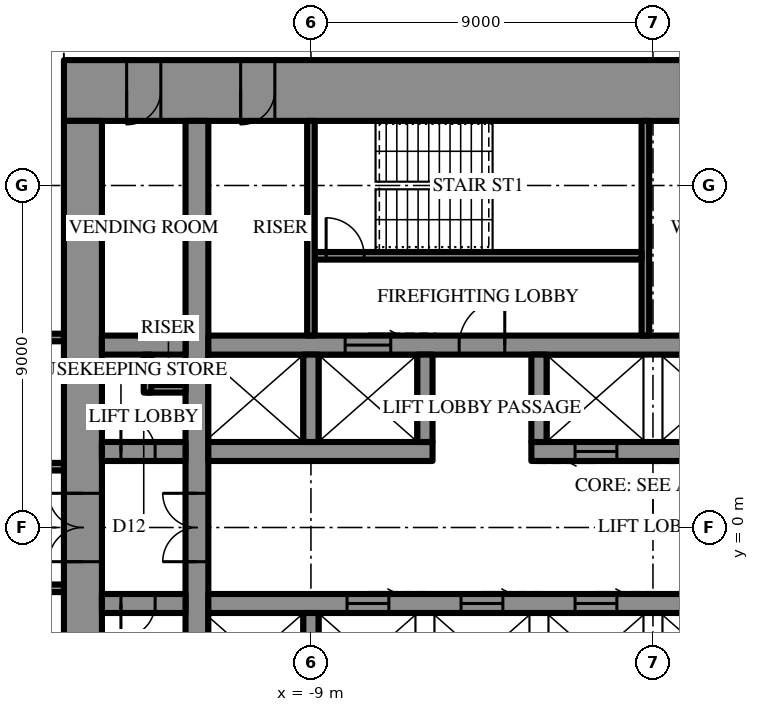
"""IFC4 building model, lengths in metres.
Left out: names, types, materials, properties, quantities, classifications, styles, units other than length and angle.
Written with IfcOpenShell. Run it as: python <this file> out.ifc"""

import sys

from ifc_helpers import new_model, si_unit, direction, frame, frame_2d, origin, place, context, subcontext, project, spatial, rectangle, extrude, element, fill, save


model = new_model("IFC4")
c1 = context("Model", 3, precision=1e-05, world=origin(), true_north=direction((0.0, 1.0)))
c2 = subcontext(c1, "Body", "Model", "MODEL_VIEW")
j1 = project(units=[si_unit("LENGTHUNIT", "METRE"), si_unit("PLANEANGLEUNIT", "RADIAN")], contexts=[c1])
p1 = place(None, origin())
s1 = spatial("IfcSite", under=j1, at=p1, CompositionType="ELEMENT")
p2 = place(p1, origin())
s2 = spatial("IfcBuilding", under=s1, at=p2, CompositionType="ELEMENT")
p3 = place(p2, frame((0.0, 0.0, 270.1)))
s3 = spatial("IfcBuildingStorey", under=s2, at=p3, CompositionType="ELEMENT", Elevation=270.1)
p4 = place(p3, frame((-15.5, 11.5, 0.0), z_axis=(0.0, 0.0, 1.0), x_axis=(1.0, 0.0, 0.0)))
e1 = element("IfcWall", 1, at=p4, inside=s3, PredefinedType="SHEAR", context=c2, shape_type="SweptSolid", body=[
    extrude(rectangle(XDim=31.0, YDim=1.6, at=frame_2d((15.5, 0.0))), origin(), (0.0, 0.0, 1.0), 4.2),
])
p5 = place(p4, frame((16.35, 0.0, 0.0)))
e2 = element("IfcOpeningElement", 2, at=p5, cuts=e1, PredefinedType="OPENING", context=c2, shape_type="SweptSolid", body=[
    extrude(rectangle(XDim=0.9, YDim=2.2, at=frame_2d((0.45, 1.1))), frame((0.0, 0.81, 0.0), z_axis=(0.0, -1.0, 0.0), x_axis=(1.0, 0.0, 0.0)), (0.0, 0.0, 1.0), 1.62),
])
p6 = place(p4, frame((19.35, 0.0, 0.0)))
e3 = element("IfcOpeningElement", 3, at=p6, cuts=e1, PredefinedType="OPENING", context=c2, shape_type="SweptSolid", body=[
    extrude(rectangle(XDim=0.9, YDim=2.2, at=frame_2d((0.45, 1.1))), frame((0.0, 0.81, 0.0), z_axis=(0.0, -1.0, 0.0), x_axis=(1.0, 0.0, 0.0)), (0.0, 0.0, 1.0), 1.62),
])
p7 = place(p4, frame((22.4, 0.0, 0.0)))
e4 = element("IfcOpeningElement", 4, at=p7, cuts=e1, PredefinedType="OPENING", context=c2, shape_type="SweptSolid", body=[
    extrude(rectangle(XDim=1.0, YDim=2.2, at=frame_2d((0.5, 1.1))), frame((0.0, 0.81, 0.0), z_axis=(0.0, -1.0, 0.0), x_axis=(1.0, 0.0, 0.0)), (0.0, 0.0, 1.0), 1.62),
])
p8 = place(p4, frame((1.65, 0.0, 0.0)))
e5 = element("IfcOpeningElement", 5, at=p8, cuts=e1, PredefinedType="OPENING", context=c2, shape_type="SweptSolid", body=[
    extrude(rectangle(XDim=0.9, YDim=2.2, at=frame_2d((0.45, 1.1))), frame((0.0, 0.81, 0.0), z_axis=(0.0, -1.0, 0.0), x_axis=(1.0, 0.0, 0.0)), (0.0, 0.0, 1.0), 1.62),
])
p9 = place(p4, frame((4.65, 0.0, 0.0)))
e6 = element("IfcOpeningElement", 6, at=p9, cuts=e1, PredefinedType="OPENING", context=c2, shape_type="SweptSolid", body=[
    extrude(rectangle(XDim=0.9, YDim=2.2, at=frame_2d((0.45, 1.1))), frame((0.0, 0.81, 0.0), z_axis=(0.0, -1.0, 0.0), x_axis=(1.0, 0.0, 0.0)), (0.0, 0.0, 1.0), 1.62),
])
p10 = place(p4, frame((25.45, 0.0, 0.0)))
e7 = element("IfcOpeningElement", 7, at=p10, cuts=e1, PredefinedType="OPENING", context=c2, shape_type="SweptSolid", body=[
    extrude(rectangle(XDim=0.9, YDim=2.2, at=frame_2d((0.45, 1.1))), frame((0.0, 0.81, 0.0), z_axis=(0.0, -1.0, 0.0), x_axis=(1.0, 0.0, 0.0)), (0.0, 0.0, 1.0), 1.62),
])
p11 = place(p4, frame((28.45, 0.0, 0.0)))
e8 = element("IfcOpeningElement", 8, at=p11, cuts=e1, PredefinedType="OPENING", context=c2, shape_type="SweptSolid", body=[
    extrude(rectangle(XDim=0.9, YDim=2.2, at=frame_2d((0.45, 1.1))), frame((0.0, 0.81, 0.0), z_axis=(0.0, -1.0, 0.0), x_axis=(1.0, 0.0, 0.0)), (0.0, 0.0, 1.0), 1.62),
])
p12 = place(p3, frame((-15.0, 10.7, 0.0), z_axis=(0.0, 0.0, 1.0), x_axis=(0.0, -1.0, 0.0)))
e9 = element("IfcWall", 9, at=p12, inside=s3, PredefinedType="SHEAR", context=c2, shape_type="SweptSolid", body=[
    extrude(rectangle(XDim=21.4, YDim=1.0, at=frame_2d((10.7, 0.0))), origin(), (0.0, 0.0, 1.0), 4.2),
])
p13 = place(p12, frame((9.8, 0.0, 0.0)))
e10 = element("IfcOpeningElement", 10, at=p13, cuts=e9, PredefinedType="OPENING", context=c2, shape_type="SweptSolid", body=[
    extrude(rectangle(XDim=1.8, YDim=2.4, at=frame_2d((0.9, 1.2))), frame((0.0, 0.51, 0.0), z_axis=(0.0, -1.0, 0.0), x_axis=(1.0, 0.0, 0.0)), (0.0, 0.0, 1.0), 1.02),
])
p14 = place(p3, frame((-12.0, -10.7, 0.0), z_axis=(0.0, 0.0, 1.0), x_axis=(0.0, 1.0, 0.0)))
e11 = element("IfcWall", 11, at=p14, inside=s3, PredefinedType="SHEAR", context=c2, shape_type="SweptSolid", body=[
    extrude(rectangle(XDim=21.4, YDim=0.6, at=frame_2d((10.7, 0.0))), origin(), (0.0, 0.0, 1.0), 4.2),
])
p15 = place(p14, frame((9.8, 0.0, 0.0)))
e12 = element("IfcOpeningElement", 12, at=p15, cuts=e11, PredefinedType="OPENING", context=c2, shape_type="SweptSolid", body=[
    extrude(rectangle(XDim=1.8, YDim=2.4, at=frame_2d((0.9, 1.2))), frame((0.0, 0.31, 0.0), z_axis=(0.0, -1.0, 0.0), x_axis=(1.0, 0.0, 0.0)), (0.0, 0.0, 1.0), 0.62),
])
p16 = place(p3, frame((-14.5, 2.0, 0.0), z_axis=(0.0, 0.0, 1.0), x_axis=(1.0, 0.0, 0.0)))
e13 = element("IfcWall", 13, at=p16, inside=s3, PredefinedType="SHEAR", context=c2, shape_type="SweptSolid", body=[
    extrude(rectangle(XDim=2.2, YDim=0.5, at=frame_2d((1.1, 0.0))), origin(), (0.0, 0.0, 1.0), 4.2),
])
p17 = place(p16, frame((0.5, 0.0, 0.0)))
e14 = element("IfcOpeningElement", 14, at=p17, cuts=e13, PredefinedType="OPENING", context=c2, shape_type="SweptSolid", body=[
    extrude(rectangle(XDim=0.9, YDim=2.2, at=frame_2d((0.45, 1.1))), frame((0.0, 0.26, 0.0), z_axis=(0.0, -1.0, 0.0), x_axis=(1.0, 0.0, 0.0)), (0.0, 0.0, 1.0), 0.52),
])
p18 = place(p3, frame((-11.7, 2.0, 0.0), z_axis=(0.0, 0.0, 1.0), x_axis=(1.0, 0.0, 0.0)))
e15 = element("IfcWall", 15, at=p18, inside=s3, PredefinedType="SHEAR", context=c2, shape_type="SweptSolid", body=[
    extrude(rectangle(XDim=5.9, YDim=0.5, at=frame_2d((2.95, 0.0))), origin(), (0.0, 0.0, 1.0), 4.2),
])
p19 = place(p3, frame((-3.2, 2.0, 0.0), z_axis=(0.0, 0.0, 1.0), x_axis=(1.0, 0.0, 0.0)))
e16 = element("IfcWall", 16, at=p19, inside=s3, PredefinedType="SHEAR", context=c2, shape_type="SweptSolid", body=[
    extrude(rectangle(XDim=14.9, YDim=0.5, at=frame_2d((7.45, 0.0))), origin(), (0.0, 0.0, 1.0), 4.2),
])
p20 = place(p19, frame((1.15, 0.0, 0.0)))
e17 = element("IfcOpeningElement", 17, at=p20, cuts=e16, PredefinedType="OPENING", context=c2, shape_type="SweptSolid", body=[
    extrude(rectangle(XDim=1.1, YDim=2.2, at=frame_2d((0.55, 1.1))), frame((0.0, 0.26, 0.0), z_axis=(0.0, -1.0, 0.0), x_axis=(1.0, 0.0, 0.0)), (0.0, 0.0, 1.0), 0.52),
])
p21 = place(p19, frame((4.15, 0.0, 0.0)))
e18 = element("IfcOpeningElement", 18, at=p21, cuts=e16, PredefinedType="OPENING", context=c2, shape_type="SweptSolid", body=[
    extrude(rectangle(XDim=1.1, YDim=2.2, at=frame_2d((0.55, 1.1))), frame((0.0, 0.26, 0.0), z_axis=(0.0, -1.0, 0.0), x_axis=(1.0, 0.0, 0.0)), (0.0, 0.0, 1.0), 0.52),
])
p22 = place(p19, frame((7.15, 0.0, 0.0)))
e19 = element("IfcOpeningElement", 19, at=p22, cuts=e16, PredefinedType="OPENING", context=c2, shape_type="SweptSolid", body=[
    extrude(rectangle(XDim=1.1, YDim=2.2, at=frame_2d((0.55, 1.1))), frame((0.0, 0.26, 0.0), z_axis=(0.0, -1.0, 0.0), x_axis=(1.0, 0.0, 0.0)), (0.0, 0.0, 1.0), 0.52),
])
p23 = place(p19, frame((10.15, 0.0, 0.0)))
e20 = element("IfcOpeningElement", 20, at=p23, cuts=e16, PredefinedType="OPENING", context=c2, shape_type="SweptSolid", body=[
    extrude(rectangle(XDim=1.1, YDim=2.2, at=frame_2d((0.55, 1.1))), frame((0.0, 0.26, 0.0), z_axis=(0.0, -1.0, 0.0), x_axis=(1.0, 0.0, 0.0)), (0.0, 0.0, 1.0), 0.52),
])
p24 = place(p3, frame((-14.5, 4.8, 0.0), z_axis=(0.0, 0.0, 1.0), x_axis=(1.0, 0.0, 0.0)))
e21 = element("IfcWall", 21, at=p24, inside=s3, PredefinedType="SHEAR", context=c2, shape_type="SweptSolid", body=[
    extrude(rectangle(XDim=2.2, YDim=0.5, at=frame_2d((1.1, 0.0))), origin(), (0.0, 0.0, 1.0), 4.2),
])
p25 = place(p3, frame((-11.7, 4.8, 0.0), z_axis=(0.0, 0.0, 1.0), x_axis=(1.0, 0.0, 0.0)))
e22 = element("IfcWall", 22, at=p25, inside=s3, PredefinedType="SHEAR", context=c2, shape_type="SweptSolid", body=[
    extrude(rectangle(XDim=23.4, YDim=0.5, at=frame_2d((11.7, 0.0))), origin(), (0.0, 0.0, 1.0), 4.2),
])
p26 = place(p25, frame((6.6, 0.0, 0.0)))
e23 = element("IfcOpeningElement", 23, at=p26, cuts=e22, PredefinedType="OPENING", context=c2, shape_type="SweptSolid", body=[
    extrude(rectangle(XDim=1.2, YDim=2.2, at=frame_2d((0.6, 1.1))), frame((0.0, 0.26, 0.0), z_axis=(0.0, -1.0, 0.0), x_axis=(1.0, 0.0, 0.0)), (0.0, 0.0, 1.0), 0.52),
])
p27 = place(p25, frame((3.6, 0.0, 0.0)))
e24 = element("IfcOpeningElement", 24, at=p27, cuts=e22, PredefinedType="OPENING", context=c2, shape_type="SweptSolid", body=[
    extrude(rectangle(XDim=1.2, YDim=2.2, at=frame_2d((0.6, 1.1))), frame((0.0, 0.26, 0.0), z_axis=(0.0, -1.0, 0.0), x_axis=(1.0, 0.0, 0.0)), (0.0, 0.0, 1.0), 0.52),
])
for number, where, z_axis, x_axis in (
    (25, (-9.0, 2.25, 0.0), (0.0, 0.0, 1.0), (0.0, 1.0, 0.0)),
    (26, (-6.0, 2.25, 0.0), (0.0, 0.0, 1.0), (0.0, 1.0, 0.0)),
    (27, (-3.0, 2.25, 0.0), (0.0, 0.0, 1.0), (0.0, 1.0, 0.0)),
):
    element("IfcWall", number, at=place(p3, frame(where, z_axis=z_axis, x_axis=x_axis)), inside=s3, PredefinedType="SHEAR", context=c2, shape_type="SweptSolid", body=[
        extrude(rectangle(XDim=2.3, YDim=0.4, at=frame_2d((1.15, 0.0))), origin(), (0.0, 0.0, 1.0), 4.2),
    ])
p28 = place(p3, frame((-0.2, 5.05, 0.0), z_axis=(0.0, 0.0, 1.0), x_axis=(0.0, 1.0, 0.0)))
e28 = element("IfcWall", 28, at=p28, inside=s3, PredefinedType="SHEAR", context=c2, shape_type="SweptSolid", body=[
    extrude(rectangle(XDim=5.65, YDim=0.2, at=frame_2d((2.825, 0.0))), origin(), (0.0, 0.0, 1.0), 4.2),
])
p29 = place(p3, frame((-8.9, 7.15, 0.0), z_axis=(0.0, 0.0, 1.0), x_axis=(1.0, 0.0, 0.0)))
e29 = element("IfcWall", 29, at=p29, inside=s3, PredefinedType="SHEAR", context=c2, shape_type="SweptSolid", body=[
    extrude(rectangle(XDim=8.6, YDim=0.2, at=frame_2d((4.3, 0.0))), origin(), (0.0, 0.0, 1.0), 4.2),
])
p30 = place(p29, frame((0.3, 0.0, 0.0)))
e30 = element("IfcOpeningElement", 30, at=p30, cuts=e29, PredefinedType="OPENING", context=c2, shape_type="SweptSolid", body=[
    extrude(rectangle(XDim=1.0, YDim=2.2, at=frame_2d((0.5, 1.1))), frame((0.0, 0.11, 0.0), z_axis=(0.0, -1.0, 0.0), x_axis=(1.0, 0.0, 0.0)), (0.0, 0.0, 1.0), 0.22),
])
p31 = place(p3, frame((3.2, -2.0, 0.0), z_axis=(0.0, 0.0, 1.0), x_axis=(-1.0, 0.0, 0.0)))
e31 = element("IfcWall", 31, at=p31, inside=s3, PredefinedType="SHEAR", context=c2, shape_type="SweptSolid", body=[
    extrude(rectangle(XDim=14.9, YDim=0.5, at=frame_2d((7.45, 0.0))), origin(), (0.0, 0.0, 1.0), 4.2),
])
p32 = place(p31, frame((1.15, 0.0, 0.0)))
e32 = element("IfcOpeningElement", 32, at=p32, cuts=e31, PredefinedType="OPENING", context=c2, shape_type="SweptSolid", body=[
    extrude(rectangle(XDim=1.1, YDim=2.2, at=frame_2d((0.55, 1.1))), frame((0.0, 0.26, 0.0), z_axis=(0.0, -1.0, 0.0), x_axis=(1.0, 0.0, 0.0)), (0.0, 0.0, 1.0), 0.52),
])
p33 = place(p31, frame((4.15, 0.0, 0.0)))
e33 = element("IfcOpeningElement", 33, at=p33, cuts=e31, PredefinedType="OPENING", context=c2, shape_type="SweptSolid", body=[
    extrude(rectangle(XDim=1.1, YDim=2.2, at=frame_2d((0.55, 1.1))), frame((0.0, 0.26, 0.0), z_axis=(0.0, -1.0, 0.0), x_axis=(1.0, 0.0, 0.0)), (0.0, 0.0, 1.0), 0.52),
])
p34 = place(p31, frame((7.15, 0.0, 0.0)))
e34 = element("IfcOpeningElement", 34, at=p34, cuts=e31, PredefinedType="OPENING", context=c2, shape_type="SweptSolid", body=[
    extrude(rectangle(XDim=1.1, YDim=2.2, at=frame_2d((0.55, 1.1))), frame((0.0, 0.26, 0.0), z_axis=(0.0, -1.0, 0.0), x_axis=(1.0, 0.0, 0.0)), (0.0, 0.0, 1.0), 0.52),
])
p35 = place(p31, frame((10.15, 0.0, 0.0)))
e35 = element("IfcOpeningElement", 35, at=p35, cuts=e31, PredefinedType="OPENING", context=c2, shape_type="SweptSolid", body=[
    extrude(rectangle(XDim=1.1, YDim=2.2, at=frame_2d((0.55, 1.1))), frame((0.0, 0.26, 0.0), z_axis=(0.0, -1.0, 0.0), x_axis=(1.0, 0.0, 0.0)), (0.0, 0.0, 1.0), 0.52),
])
p36 = place(p3, frame((-12.3, -2.0, 0.0), z_axis=(0.0, 0.0, 1.0), x_axis=(-1.0, 0.0, 0.0)))
e36 = element("IfcWall", 36, at=p36, inside=s3, PredefinedType="SHEAR", context=c2, shape_type="SweptSolid", body=[
    extrude(rectangle(XDim=2.2, YDim=0.5, at=frame_2d((1.1, 0.0))), origin(), (0.0, 0.0, 1.0), 4.2),
])
p37 = place(p36, frame((0.8, 0.0, 0.0)))
e37 = element("IfcOpeningElement", 37, at=p37, cuts=e36, PredefinedType="OPENING", context=c2, shape_type="SweptSolid", body=[
    extrude(rectangle(XDim=0.9, YDim=2.2, at=frame_2d((0.45, 1.1))), frame((0.0, 0.26, 0.0), z_axis=(0.0, -1.0, 0.0), x_axis=(1.0, 0.0, 0.0)), (0.0, 0.0, 1.0), 0.52),
])
p38 = place(p3, frame((-9.0, -2.25, 0.0), z_axis=(0.0, 0.0, 1.0), x_axis=(0.0, -1.0, 0.0)))
e38 = element("IfcWall", 38, at=p38, inside=s3, PredefinedType="SHEAR", context=c2, shape_type="SweptSolid", body=[
    extrude(rectangle(XDim=2.3, YDim=0.4, at=frame_2d((1.15, 0.0))), origin(), (0.0, 0.0, 1.0), 4.2),
])
p39 = place(p3, frame((-9.0, 5.05, 0.0), z_axis=(0.0, 0.0, 1.0), x_axis=(0.0, 1.0, 0.0)))
e39 = element("IfcWall", 39, at=p39, inside=s3, PredefinedType="PARTITIONING", context=c2, shape_type="SweptSolid", body=[
    extrude(rectangle(XDim=5.65, YDim=0.2, at=frame_2d((2.825, 0.0))), origin(), (0.0, 0.0, 1.0), 4.0),
])
for number, where, z_axis, x_axis in (
    (40, (-13.3, 3.65, 0.0), (0.0, 0.0, 1.0), (1.0, 0.0, 0.0)),
    (41, (-13.3, 3.55, 0.0), (0.0, 0.0, 1.0), (0.0, 1.0, 0.0)),
):
    element("IfcWall", number, at=place(p3, frame(where, z_axis=z_axis, x_axis=x_axis)), inside=s3, PredefinedType="PARTITIONING", context=c2, shape_type="SweptSolid", body=[
        extrude(rectangle(XDim=1.0, YDim=0.2, at=frame_2d((0.5, 0.0))), origin(), (0.0, 0.0, 1.0), 4.0),
    ])
p40 = place(p3, frame((-15.5, 1.6, 0.0), z_axis=(0.0, 0.0, 1.0), x_axis=(-1.0, 0.0, 0.0)))
e42 = element("IfcWall", 42, at=p40, inside=s3, PredefinedType="PARTITIONING", context=c2, shape_type="SweptSolid", body=[
    extrude(rectangle(XDim=12.2, YDim=0.2, at=frame_2d((6.1, 0.0))), origin(), (0.0, 0.0, 1.0), 4.0),
])
p41 = place(p40, frame((8.04, 0.0, 0.0)))
e43 = element("IfcOpeningElement", 43, at=p41, cuts=e42, PredefinedType="OPENING", context=c2, shape_type="SweptSolid", body=[
    extrude(rectangle(XDim=1.0, YDim=2.2, at=frame_2d((0.5, 1.1))), frame((0.0, 0.11, 0.0), z_axis=(0.0, -1.0, 0.0), x_axis=(1.0, 0.0, 0.0)), (0.0, 0.0, 1.0), 0.22),
])
p42 = place(p3, frame((-15.5, -1.6, 0.0), z_axis=(0.0, 0.0, 1.0), x_axis=(-1.0, 0.0, 0.0)))
e44 = element("IfcWall", 44, at=p42, inside=s3, PredefinedType="PARTITIONING", context=c2, shape_type="SweptSolid", body=[
    extrude(rectangle(XDim=12.2, YDim=0.2, at=frame_2d((6.1, 0.0))), origin(), (0.0, 0.0, 1.0), 4.0),
])
p43 = place(p42, frame((8.04, 0.0, 0.0)))
e45 = element("IfcOpeningElement", 45, at=p43, cuts=e44, PredefinedType="OPENING", context=c2, shape_type="SweptSolid", body=[
    extrude(rectangle(XDim=1.0, YDim=2.2, at=frame_2d((0.5, 1.1))), frame((0.0, 0.11, 0.0), z_axis=(0.0, -1.0, 0.0), x_axis=(1.0, 0.0, 0.0)), (0.0, 0.0, 1.0), 0.22),
])
p44 = place(p3, frame((-15.5, 5.0, 0.0), z_axis=(0.0, 0.0, 1.0), x_axis=(-1.0, 0.0, 0.0)))
e46 = element("IfcWall", 46, at=p44, inside=s3, PredefinedType="PARTITIONING", context=c2, shape_type="SweptSolid", body=[
    extrude(rectangle(XDim=14.845, YDim=0.2, at=frame_2d((7.423, 0.0))), origin(), (0.0, 0.0, 1.0), 4.0),
])
p45 = place(p44, frame((0.985, 0.0, 0.0)))
e47 = element("IfcOpeningElement", 47, at=p45, cuts=e46, PredefinedType="OPENING", context=c2, shape_type="SweptSolid", body=[
    extrude(rectangle(XDim=1.0, YDim=2.2, at=frame_2d((0.5, 1.1))), frame((0.0, 0.11, 0.0), z_axis=(0.0, -1.0, 0.0), x_axis=(1.0, 0.0, 0.0)), (0.0, 0.0, 1.0), 0.22),
])
p46 = place(p13, frame((1.8, 0.0, 0.0), z_axis=(0.0, 0.0, 1.0), x_axis=(-1.0, 0.0, 0.0)))
e48 = element("IfcDoor", 48, at=p46, inside=s3, OperationType="DOUBLE_DOOR_SINGLE_SWING", PredefinedType="DOOR", context=c2, shape_type="SweptSolid", body=[
    extrude(rectangle(XDim=1.8, YDim=2.4, at=frame_2d((0.9, 1.2))), frame((0.0, 0.025, 0.0), z_axis=(0.0, -1.0, 0.0), x_axis=(1.0, 0.0, 0.0)), (0.0, 0.0, 1.0), 0.05),
])
fill(e10, e48)
p47 = place(p26, origin())
e49 = element("IfcDoor", 49, at=p47, inside=s3, OperationType="SINGLE_SWING_LEFT", PredefinedType="DOOR", context=c2, shape_type="SweptSolid", body=[
    extrude(rectangle(XDim=1.2, YDim=2.2, at=frame_2d((0.6, 1.1))), frame((0.0, 0.025, 0.0), z_axis=(0.0, -1.0, 0.0), x_axis=(1.0, 0.0, 0.0)), (0.0, 0.0, 1.0), 0.05),
])
fill(e23, e49)
p48 = place(p30, origin())
e50 = element("IfcDoor", 50, at=p48, inside=s3, OperationType="SINGLE_SWING_RIGHT", PredefinedType="DOOR", context=c2, shape_type="SweptSolid", body=[
    extrude(rectangle(XDim=1.0, YDim=2.2, at=frame_2d((0.5, 1.1))), frame((0.0, 0.025, 0.0), z_axis=(0.0, -1.0, 0.0), x_axis=(1.0, 0.0, 0.0)), (0.0, 0.0, 1.0), 0.05),
])
fill(e30, e50)
p49 = place(p8, frame((0.9, 0.0, 0.0), z_axis=(0.0, 0.0, 1.0), x_axis=(-1.0, 0.0, 0.0)))
e51 = element("IfcDoor", 51, at=p49, inside=s3, OperationType="SINGLE_SWING_LEFT", PredefinedType="DOOR", context=c2, shape_type="SweptSolid", body=[
    extrude(rectangle(XDim=0.9, YDim=2.2, at=frame_2d((0.45, 1.1))), frame((0.0, 0.025, 0.0), z_axis=(0.0, -1.0, 0.0), x_axis=(1.0, 0.0, 0.0)), (0.0, 0.0, 1.0), 0.05),
])
fill(e5, e51)
p50 = place(p9, frame((0.9, 0.0, 0.0), z_axis=(0.0, 0.0, 1.0), x_axis=(-1.0, 0.0, 0.0)))
e52 = element("IfcDoor", 52, at=p50, inside=s3, OperationType="SINGLE_SWING_LEFT", PredefinedType="DOOR", context=c2, shape_type="SweptSolid", body=[
    extrude(rectangle(XDim=0.9, YDim=2.2, at=frame_2d((0.45, 1.1))), frame((0.0, 0.025, 0.0), z_axis=(0.0, -1.0, 0.0), x_axis=(1.0, 0.0, 0.0)), (0.0, 0.0, 1.0), 0.05),
])
fill(e6, e52)
p51 = place(p17, origin())
e53 = element("IfcDoor", 53, at=p51, inside=s3, OperationType="SINGLE_SWING_RIGHT", PredefinedType="DOOR", context=c2, shape_type="SweptSolid", body=[
    extrude(rectangle(XDim=0.9, YDim=2.2, at=frame_2d((0.45, 1.1))), frame((0.0, 0.025, 0.0), z_axis=(0.0, -1.0, 0.0), x_axis=(1.0, 0.0, 0.0)), (0.0, 0.0, 1.0), 0.05),
])
fill(e14, e53)
p52 = place(p37, origin())
e54 = element("IfcDoor", 54, at=p52, inside=s3, OperationType="SINGLE_SWING_LEFT", PredefinedType="DOOR", context=c2, shape_type="SweptSolid", body=[
    extrude(rectangle(XDim=0.9, YDim=2.2, at=frame_2d((0.45, 1.1))), frame((0.0, 0.025, 0.0), z_axis=(0.0, -1.0, 0.0), x_axis=(1.0, 0.0, 0.0)), (0.0, 0.0, 1.0), 0.05),
])
fill(e37, e54)
p53 = place(p15, origin())
e55 = element("IfcDoor", 55, at=p53, inside=s3, OperationType="DOUBLE_DOOR_SINGLE_SWING", PredefinedType="DOOR", context=c2, shape_type="SweptSolid", body=[
    extrude(rectangle(XDim=1.8, YDim=2.4, at=frame_2d((0.9, 1.2))), frame((0.0, 0.025, 0.0), z_axis=(0.0, -1.0, 0.0), x_axis=(1.0, 0.0, 0.0)), (0.0, 0.0, 1.0), 0.05),
])
fill(e12, e55)
p54 = place(p27, origin())
e56 = element("IfcDoor", 56, at=p54, inside=s3, OperationType="SLIDING_TO_LEFT", PredefinedType="DOOR", context=c2, shape_type="SweptSolid", body=[
    extrude(rectangle(XDim=1.2, YDim=2.2, at=frame_2d((0.6, 1.1))), frame((0.0, 0.025, 0.0), z_axis=(0.0, -1.0, 0.0), x_axis=(1.0, 0.0, 0.0)), (0.0, 0.0, 1.0), 0.05),
])
fill(e24, e56)
p55 = place(p20, frame((1.1, 0.0, 0.0), z_axis=(0.0, 0.0, 1.0), x_axis=(-1.0, 0.0, 0.0)))
e57 = element("IfcDoor", 57, at=p55, inside=s3, OperationType="SLIDING_TO_LEFT", PredefinedType="DOOR", context=c2, shape_type="SweptSolid", body=[
    extrude(rectangle(XDim=1.1, YDim=2.2, at=frame_2d((0.55, 1.1))), frame((0.0, 0.025, 0.0), z_axis=(0.0, -1.0, 0.0), x_axis=(1.0, 0.0, 0.0)), (0.0, 0.0, 1.0), 0.05),
])
fill(e17, e57)
p56 = place(p33, frame((1.1, 0.0, 0.0), z_axis=(0.0, 0.0, 1.0), x_axis=(-1.0, 0.0, 0.0)))
e58 = element("IfcDoor", 58, at=p56, inside=s3, OperationType="SLIDING_TO_LEFT", PredefinedType="DOOR", context=c2, shape_type="SweptSolid", body=[
    extrude(rectangle(XDim=1.1, YDim=2.2, at=frame_2d((0.55, 1.1))), frame((0.0, 0.025, 0.0), z_axis=(0.0, -1.0, 0.0), x_axis=(1.0, 0.0, 0.0)), (0.0, 0.0, 1.0), 0.05),
])
fill(e33, e58)
p57 = place(p34, frame((1.1, 0.0, 0.0), z_axis=(0.0, 0.0, 1.0), x_axis=(-1.0, 0.0, 0.0)))
e59 = element("IfcDoor", 59, at=p57, inside=s3, OperationType="SLIDING_TO_LEFT", PredefinedType="DOOR", context=c2, shape_type="SweptSolid", body=[
    extrude(rectangle(XDim=1.1, YDim=2.2, at=frame_2d((0.55, 1.1))), frame((0.0, 0.025, 0.0), z_axis=(0.0, -1.0, 0.0), x_axis=(1.0, 0.0, 0.0)), (0.0, 0.0, 1.0), 0.05),
])
fill(e34, e59)
p58 = place(p35, frame((1.1, 0.0, 0.0), z_axis=(0.0, 0.0, 1.0), x_axis=(-1.0, 0.0, 0.0)))
e60 = element("IfcDoor", 60, at=p58, inside=s3, OperationType="SLIDING_TO_LEFT", PredefinedType="DOOR", context=c2, shape_type="SweptSolid", body=[
    extrude(rectangle(XDim=1.1, YDim=2.2, at=frame_2d((0.55, 1.1))), frame((0.0, 0.025, 0.0), z_axis=(0.0, -1.0, 0.0), x_axis=(1.0, 0.0, 0.0)), (0.0, 0.0, 1.0), 0.05),
])
fill(e35, e60)
save(model, sys.argv[1])
